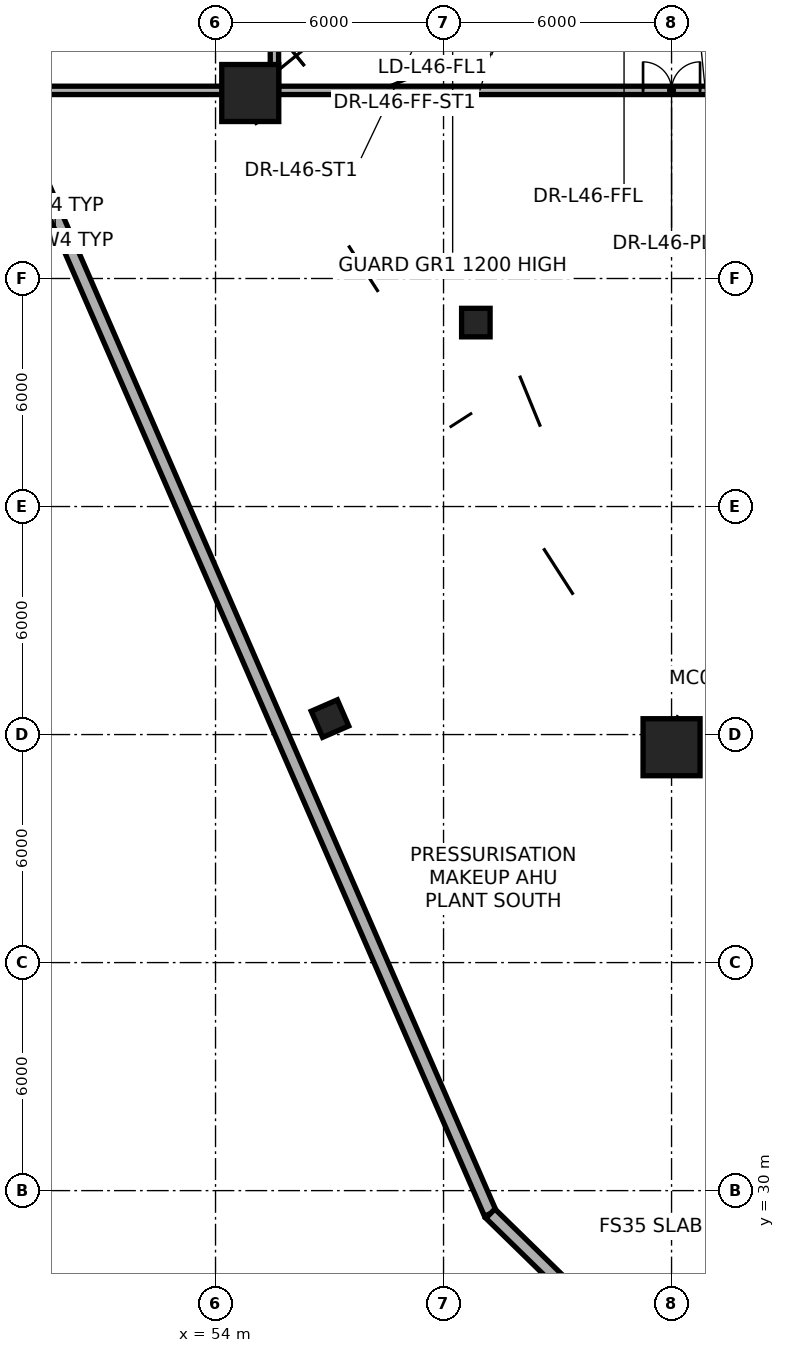
"""IFC4 building model, lengths in metres.
Left out: names, types, materials, properties, quantities, classifications, styles, units other than length and angle.
Written with IfcOpenShell. Run it as: python <this file> out.ifc"""

import sys

from ifc_helpers import new_model, si_unit, direction, frame, frame_2d, origin, origin_2d, place, context, subcontext, project, spatial, rectangle, extrude, element, fill, save


model = new_model("IFC4")
c1 = context("Model", 3, precision=1e-05, world=origin(), true_north=direction((0.0, 1.0)))
c2 = subcontext(c1, "Body", "Model", "MODEL_VIEW")
j1 = project(units=[si_unit("LENGTHUNIT", "METRE"), si_unit("PLANEANGLEUNIT", "RADIAN")], contexts=[c1])
p1 = place(None, origin())
s1 = spatial("IfcSite", under=j1, at=p1, CompositionType="ELEMENT")
p2 = place(p1, origin())
s2 = spatial("IfcBuilding", under=s1, at=p2, CompositionType="ELEMENT")
p3 = place(p2, frame((0.0, 0.0, 175.2)))
s3 = spatial("IfcBuildingStorey", under=s2, at=p3, CompositionType="ELEMENT", Elevation=175.2)
p4 = place(p3, frame((60.85, 52.84, 0.0), z_axis=(0.0, 0.0, 1.0), x_axis=(1.0, 0.0, 0.0)))
e1 = element("IfcColumn", 1, at=p4, inside=s3, PredefinedType="COLUMN", context=c2, shape_type="SweptSolid", body=[
    extrude(rectangle(XDim=0.75, YDim=0.75, at=origin_2d()), origin(), (0.0, 0.0, 1.0), 4.2),
])
for number, where, z_axis, x_axis in (
    (2, (66.0, 41.667, 0.0), (0.0, 0.0, 1.0), (1.0, 0.0, 0.0)),
    (3, (54.914, 58.88, 0.0), (0.0, 0.0, 1.0), (1.0, 0.0, 0.0)),
):
    element("IfcColumn", number, at=place(p3, frame(where, z_axis=z_axis, x_axis=x_axis)), inside=s3, PredefinedType="COLUMN", context=c2, shape_type="SweptSolid", body=[
        extrude(rectangle(XDim=1.5, YDim=1.5, at=origin_2d()), origin(), (0.0, 0.0, 1.0), 4.2),
    ])
p5 = place(p3, frame((56.989, 42.321, 0.003), z_axis=(0.010698106163, 0.047385633276, 0.998819379209), x_axis=(-0.187753455658, 0.981205846907, -0.044539037743)))
e4 = element("IfcColumn", 4, at=p5, inside=s3, PredefinedType="COLUMN", context=c2, shape_type="SweptSolid", body=[
    extrude(rectangle(XDim=0.75, YDim=0.75, at=origin_2d()), origin(), (0.0, 0.0, 1.0), 4.199),
])
p6 = place(p3, frame((61.232, 29.396, 0.0), z_axis=(0.0, 0.0, 1.0), x_axis=(-0.399299124271, 0.916820707312, 0.0)))
e5 = element("IfcWall", 5, at=p6, inside=s3, PredefinedType="STANDARD", context=c2, shape_type="SweptSolid", body=[
    extrude(rectangle(XDim=55.751, YDim=0.34, at=frame_2d((27.876, 0.0))), origin(), (0.0, 0.0, 1.0), 0.85),
])
p7 = place(p3, frame((64.039, 26.656, 0.0), z_axis=(0.0, 0.0, 1.0), x_axis=(-0.715583095566, 0.698527618166, 0.0)))
e6 = element("IfcWall", 6, at=p7, inside=s3, PredefinedType="STANDARD", context=c2, shape_type="SweptSolid", body=[
    extrude(rectangle(XDim=3.922, YDim=0.34, at=frame_2d((1.961, 0.0))), origin(), (0.0, 0.0, 1.0), 3.95),
])
p8 = place(p3, frame((48.453, 58.95, 0.0), z_axis=(0.0, 0.0, 1.0), x_axis=(1.0, 0.0, 0.0)))
e7 = element("IfcWall", 7, at=p8, inside=s3, PredefinedType="PARTITIONING", context=c2, shape_type="SweptSolid", body=[
    extrude(rectangle(XDim=7.097, YDim=0.22, at=frame_2d((3.548, 0.0))), origin(), (0.0, 0.0, 1.0), 3.15),
])
p9 = place(p3, frame((55.55, 58.95, 0.0), z_axis=(0.0, 0.0, 1.0), x_axis=(1.0, 0.0, 0.0)))
e8 = element("IfcWall", 8, at=p9, inside=s3, PredefinedType="PARTITIONING", context=c2, shape_type="SweptSolid", body=[
    extrude(rectangle(XDim=20.9, YDim=0.22, at=frame_2d((10.45, 0.0))), origin(), (0.0, 0.0, 1.0), 3.33),
])
p10 = place(p9, frame((9.7, 0.0, 0.0)))
e9 = element("IfcOpeningElement", 9, at=p10, cuts=e8, PredefinedType="OPENING", context=c2, shape_type="SweptSolid", body=[
    extrude(rectangle(XDim=1.5, YDim=2.2, at=frame_2d((0.75, 1.1))), frame((0.0, 0.12, 0.0), z_axis=(0.0, -1.0, 0.0), x_axis=(1.0, 0.0, 0.0)), (0.0, 0.0, 1.0), 0.24),
])
p11 = place(p3, frame((55.55, 58.95, 0.0), z_axis=(0.0, 0.0, 1.0), x_axis=(0.0, 1.0, 0.0)))
e10 = element("IfcWall", 10, at=p11, inside=s3, PredefinedType="PARTITIONING", context=c2, shape_type="SweptSolid", body=[
    extrude(rectangle(XDim=18.1, YDim=0.22, at=frame_2d((9.05, 0.0))), origin(), (0.0, 0.0, 1.0), 3.33),
])
p12 = place(p11, frame((7.34, 0.0, 0.0)))
e11 = element("IfcOpeningElement", 11, at=p12, cuts=e10, PredefinedType="OPENING", context=c2, shape_type="SweptSolid", body=[
    extrude(rectangle(XDim=1.05, YDim=2.15, at=frame_2d((0.525, 1.075))), frame((0.0, 0.12, 0.0), z_axis=(0.0, -1.0, 0.0), x_axis=(1.0, 0.0, 0.0)), (0.0, 0.0, 1.0), 0.24),
])
p13 = place(p11, frame((14.15, 0.0, 0.0)))
e12 = element("IfcOpeningElement", 12, at=p13, cuts=e10, PredefinedType="OPENING", context=c2, shape_type="SweptSolid", body=[
    extrude(rectangle(XDim=1.05, YDim=2.15, at=frame_2d((0.525, 1.075))), frame((0.0, 0.12, 0.0), z_axis=(0.0, -1.0, 0.0), x_axis=(1.0, 0.0, 0.0)), (0.0, 0.0, 1.0), 0.24),
])
p14 = place(p10, origin())
e13 = element("IfcDoor", 13, at=p14, inside=s3, OperationType="DOUBLE_DOOR_SINGLE_SWING", PredefinedType="DOOR", context=c2, shape_type="SweptSolid", body=[
    extrude(rectangle(XDim=1.5, YDim=2.2, at=frame_2d((0.75, 1.1))), frame((0.0, 0.025, 0.0), z_axis=(0.0, -1.0, 0.0), x_axis=(1.0, 0.0, 0.0)), (0.0, 0.0, 1.0), 0.05),
])
fill(e9, e13)
save(model, sys.argv[1])
